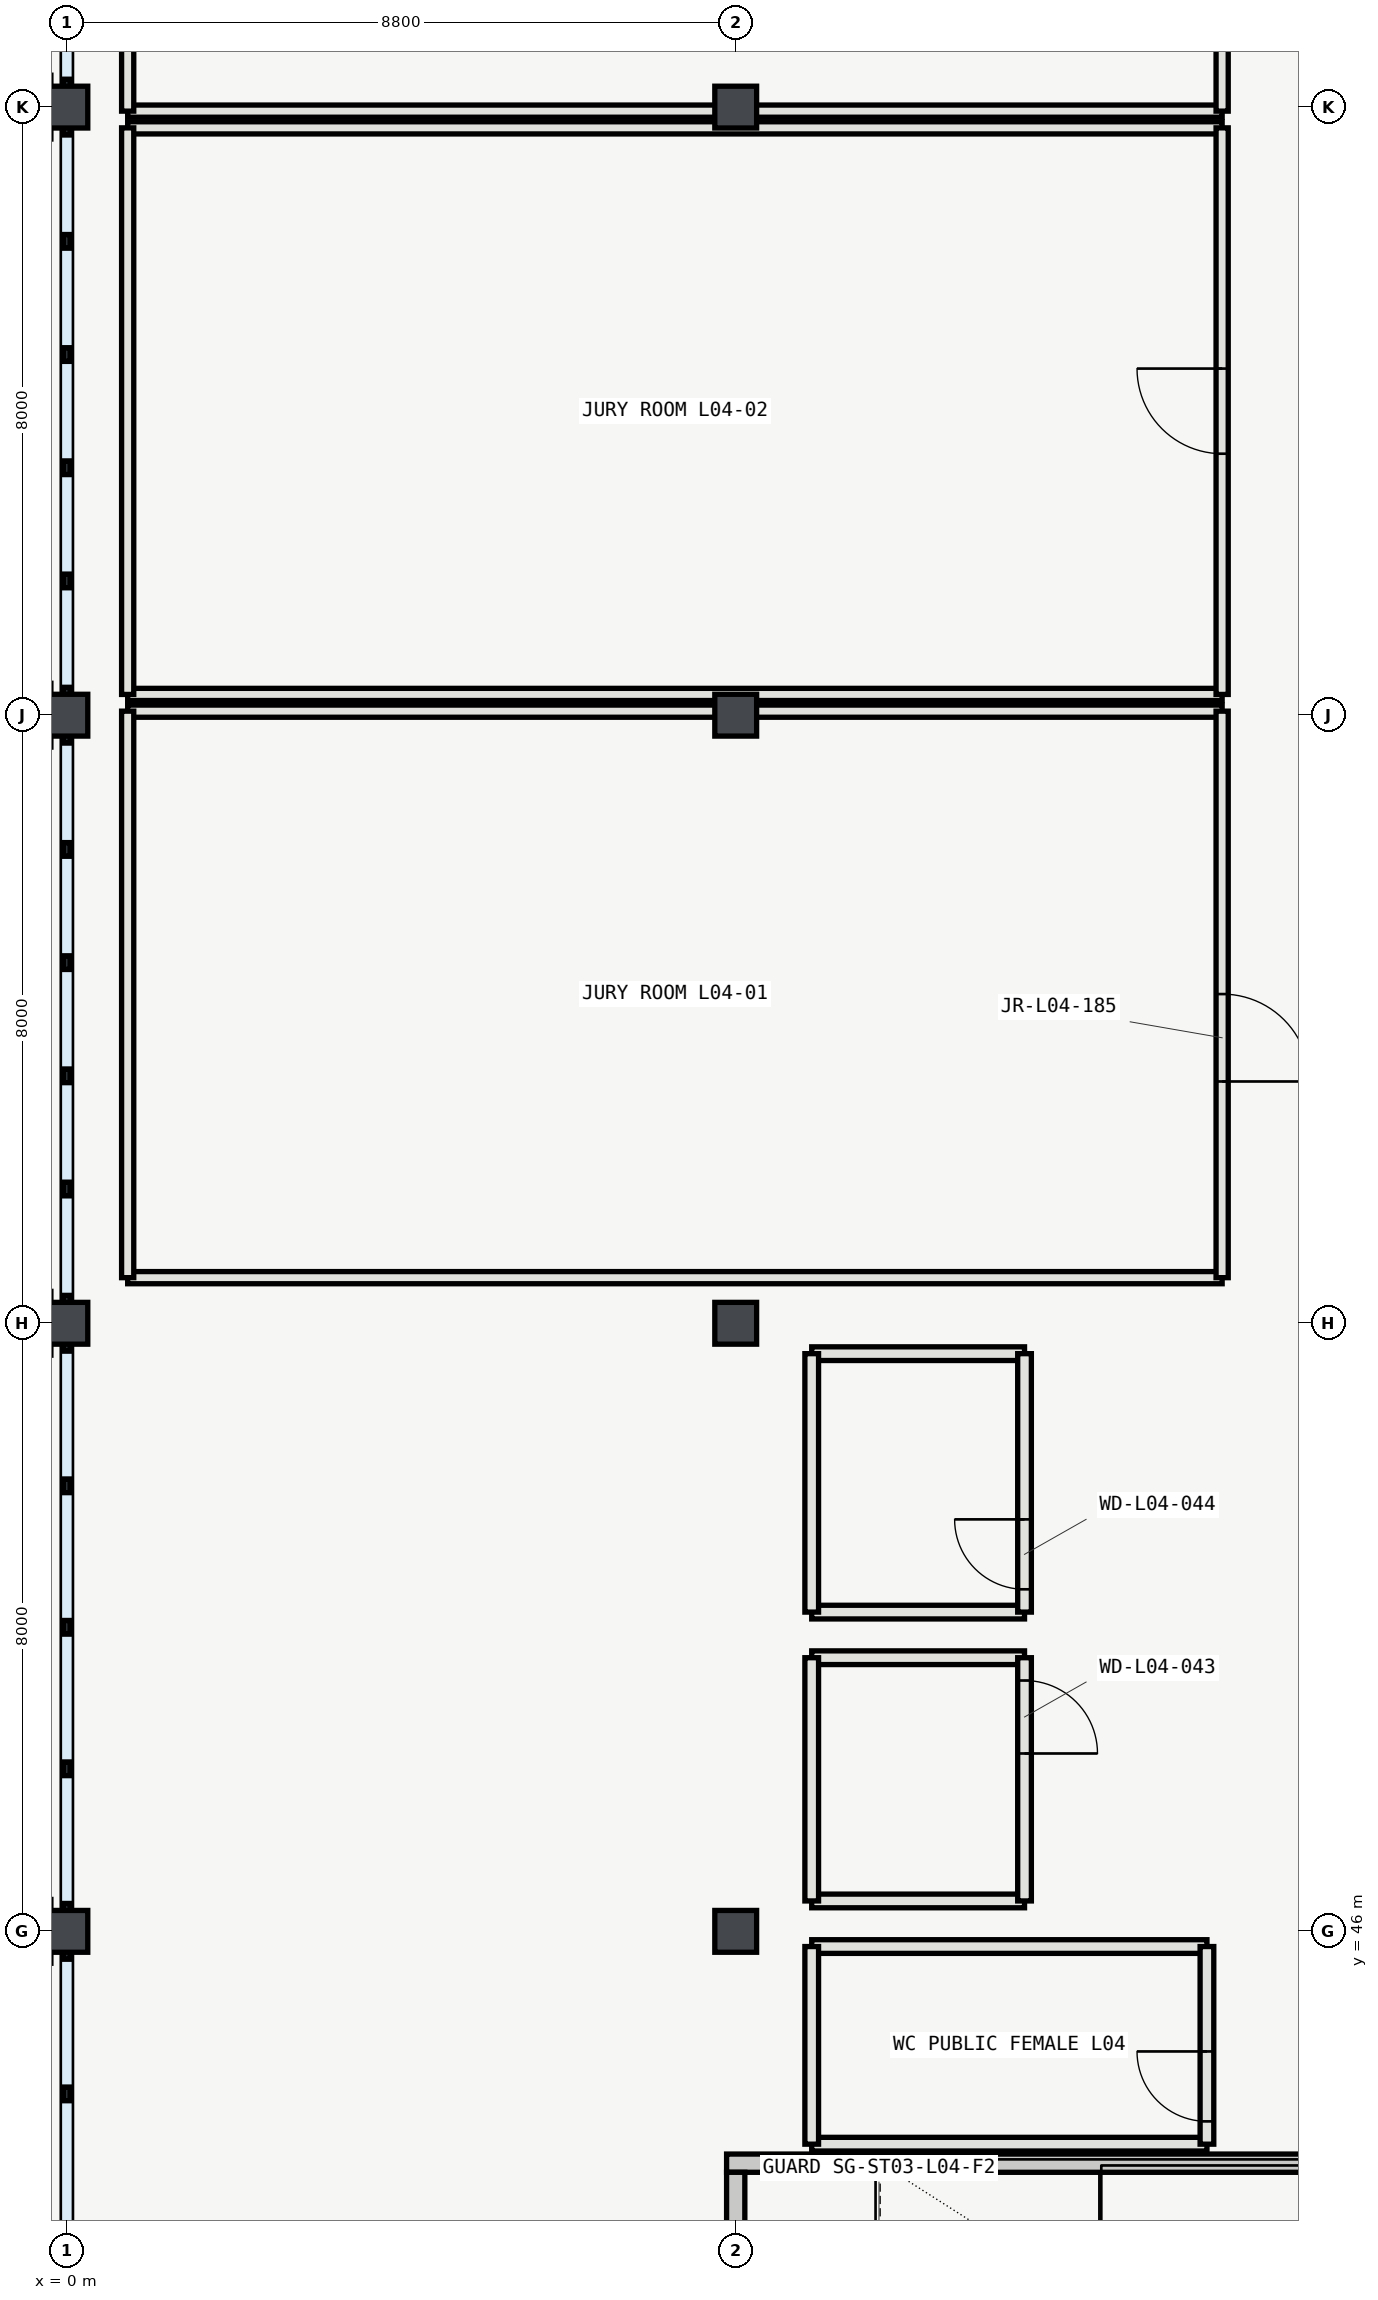
"""IFC4 building model, lengths in metres.
Left out: names, types, materials, properties, quantities, classifications, styles, units other than length and angle.
Written with IfcOpenShell. Run it as: python <this file> out.ifc"""

import sys

from ifc_helpers import new_model, si_unit, direction, frame, frame_2d, origin, origin_2d, place, context, subcontext, project, spatial, rectangle, hollow_rectangle, extrude, element, fill, save


model = new_model("IFC4")
c1 = context("Model", 3, precision=1e-05, world=origin(), true_north=direction((0.0, 1.0)))
c2 = subcontext(c1, "Body", "Model", "MODEL_VIEW")
j1 = project(units=[si_unit("LENGTHUNIT", "METRE"), si_unit("PLANEANGLEUNIT", "RADIAN")], contexts=[c1])
p1 = place(None, origin())
s1 = spatial("IfcSite", under=j1, at=p1, CompositionType="ELEMENT")
p2 = place(p1, origin())
s2 = spatial("IfcBuilding", under=s1, at=p2, CompositionType="ELEMENT")
p3 = place(p2, frame((0.0, 0.0, 20.4)))
s3 = spatial("IfcBuildingStorey", under=s2, at=p3, CompositionType="ELEMENT", Elevation=20.4)
for number, where, z_axis, x_axis in (
    (1, (0.0, 46.0, 0.0), (0.0, 0.0, 1.0), (1.0, 0.0, 0.0)),
    (2, (0.0, 54.0, 0.0), (0.0, 0.0, 1.0), (1.0, 0.0, 0.0)),
    (3, (0.0, 62.0, 0.0), (0.0, 0.0, 1.0), (1.0, 0.0, 0.0)),
    (4, (0.0, 70.0, 0.0), (0.0, 0.0, 1.0), (1.0, 0.0, 0.0)),
    (5, (8.8, 46.0, 0.0), (0.0, 0.0, 1.0), (1.0, 0.0, 0.0)),
    (6, (8.8, 54.0, 0.0), (0.0, 0.0, 1.0), (1.0, 0.0, 0.0)),
    (7, (8.8, 62.0, 0.0), (0.0, 0.0, 1.0), (1.0, 0.0, 0.0)),
    (8, (8.8, 70.0, 0.0), (0.0, 0.0, 1.0), (1.0, 0.0, 0.0)),
):
    element("IfcColumn", number, at=place(p3, frame(where, z_axis=z_axis, x_axis=x_axis)), inside=s3, PredefinedType="COLUMN", context=c2, shape_type="SweptSolid", body=[
        extrude(hollow_rectangle(XDim=0.55, YDim=0.55, WallThickness=0.022, InnerFilletRadius=0.022, OuterFilletRadius=0.044, at=origin_2d()), origin(), (0.0, 0.0, 1.0), 4.2),
    ])
for number, where, z_axis, x_axis in (
    (9, (9.8, 46.4, 0.0), (0.0, 0.0, 1.0), (1.0, 0.0, 0.0)),
    (10, (12.6, 49.6, 0.0), (0.0, 0.0, 1.0), (-1.0, 0.0, 0.0)),
):
    element("IfcWall", number, at=place(p3, frame(where, z_axis=z_axis, x_axis=x_axis)), inside=s3, PredefinedType="PLUMBINGWALL", context=c2, shape_type="SweptSolid", body=[
        extrude(rectangle(XDim=2.8, YDim=0.18, at=frame_2d((1.4, 0.0))), origin(), (0.0, 0.0, 1.0), 3.92),
    ])
p4 = place(p3, frame((9.8, 49.6, 0.0), z_axis=(0.0, 0.0, 1.0), x_axis=(0.0, -1.0, 0.0)))
e11 = element("IfcWall", 11, at=p4, inside=s3, PredefinedType="PLUMBINGWALL", context=c2, shape_type="SweptSolid", body=[
    extrude(rectangle(XDim=3.2, YDim=0.18, at=frame_2d((1.6, 0.0))), origin(), (0.0, 0.0, 1.0), 3.92),
])
p5 = place(p3, frame((12.6, 46.4, 0.0), z_axis=(0.0, 0.0, 1.0), x_axis=(0.0, 1.0, 0.0)))
e12 = element("IfcWall", 12, at=p5, inside=s3, PredefinedType="PLUMBINGWALL", context=c2, shape_type="SweptSolid", body=[
    extrude(rectangle(XDim=3.2, YDim=0.18, at=frame_2d((1.6, 0.0))), origin(), (0.0, 0.0, 1.0), 3.92),
])
p6 = place(p5, frame((1.94, 0.0, 0.0)))
e13 = element("IfcOpeningElement", 13, at=p6, cuts=e12, PredefinedType="OPENING", context=c2, shape_type="SweptSolid", body=[
    extrude(rectangle(XDim=0.96, YDim=2.1, at=frame_2d((0.48, 1.05))), frame((0.0, 0.1, 0.0), z_axis=(0.0, -1.0, 0.0), x_axis=(1.0, 0.0, 0.0)), (0.0, 0.0, 1.0), 0.2),
])
for number, where, z_axis, x_axis in (
    (14, (9.8, 50.2, 0.0), (0.0, 0.0, 1.0), (1.0, 0.0, 0.0)),
    (15, (12.6, 53.6, 0.0), (0.0, 0.0, 1.0), (-1.0, 0.0, 0.0)),
):
    element("IfcWall", number, at=place(p3, frame(where, z_axis=z_axis, x_axis=x_axis)), inside=s3, PredefinedType="PLUMBINGWALL", context=c2, shape_type="SweptSolid", body=[
        extrude(rectangle(XDim=2.8, YDim=0.18, at=frame_2d((1.4, 0.0))), origin(), (0.0, 0.0, 1.0), 3.92),
    ])
p7 = place(p3, frame((9.8, 53.6, 0.0), z_axis=(0.0, 0.0, 1.0), x_axis=(0.0, -1.0, 0.0)))
e16 = element("IfcWall", 16, at=p7, inside=s3, PredefinedType="PLUMBINGWALL", context=c2, shape_type="SweptSolid", body=[
    extrude(rectangle(XDim=3.4, YDim=0.18, at=frame_2d((1.7, 0.0))), origin(), (0.0, 0.0, 1.0), 3.92),
])
p8 = place(p3, frame((12.6, 50.2, 0.0), z_axis=(0.0, 0.0, 1.0), x_axis=(0.0, 1.0, 0.0)))
e17 = element("IfcWall", 17, at=p8, inside=s3, PredefinedType="PLUMBINGWALL", context=c2, shape_type="SweptSolid", body=[
    extrude(rectangle(XDim=3.4, YDim=0.18, at=frame_2d((1.7, 0.0))), origin(), (0.0, 0.0, 1.0), 3.92),
])
p9 = place(p8, frame((0.3, 0.0, 0.0)))
e18 = element("IfcOpeningElement", 18, at=p9, cuts=e17, PredefinedType="OPENING", context=c2, shape_type="SweptSolid", body=[
    extrude(rectangle(XDim=0.92, YDim=2.1, at=frame_2d((0.46, 1.05))), frame((0.0, 0.1, 0.0), z_axis=(0.0, -1.0, 0.0), x_axis=(1.0, 0.0, 0.0)), (0.0, 0.0, 1.0), 0.2),
])
p10 = place(p3, frame((9.8, 43.2, 0.0), z_axis=(0.0, 0.0, 1.0), x_axis=(1.0, 0.0, 0.0)))
e19 = element("IfcWall", 19, at=p10, inside=s3, PredefinedType="PLUMBINGWALL", context=c2, shape_type="SweptSolid", body=[
    extrude(rectangle(XDim=5.2, YDim=0.18, at=frame_2d((2.6, 0.0))), origin(), (0.0, 0.0, 1.0), 3.92),
])
p11 = place(p3, frame((15.0, 45.8, 0.0), z_axis=(0.0, 0.0, 1.0), x_axis=(-1.0, 0.0, 0.0)))
e20 = element("IfcWall", 20, at=p11, inside=s3, PredefinedType="PLUMBINGWALL", context=c2, shape_type="SweptSolid", body=[
    extrude(rectangle(XDim=5.2, YDim=0.18, at=frame_2d((2.6, 0.0))), origin(), (0.0, 0.0, 1.0), 3.596),
])
p12 = place(p3, frame((9.8, 45.8, 0.0), z_axis=(0.0, 0.0, 1.0), x_axis=(0.0, -1.0, 0.0)))
e21 = element("IfcWall", 21, at=p12, inside=s3, PredefinedType="PLUMBINGWALL", context=c2, shape_type="SweptSolid", body=[
    extrude(rectangle(XDim=2.6, YDim=0.18, at=frame_2d((1.3, 0.0))), origin(), (0.0, 0.0, 1.0), 3.92),
])
p13 = place(p3, frame((15.0, 43.2, 0.0), z_axis=(0.0, 0.0, 1.0), x_axis=(0.0, 1.0, 0.0)))
e22 = element("IfcWall", 22, at=p13, inside=s3, PredefinedType="PLUMBINGWALL", context=c2, shape_type="SweptSolid", body=[
    extrude(rectangle(XDim=2.6, YDim=0.18, at=frame_2d((1.3, 0.0))), origin(), (0.0, 0.0, 1.0), 3.92),
])
p14 = place(p13, frame((0.3, 0.0, 0.0)))
e23 = element("IfcOpeningElement", 23, at=p14, cuts=e22, PredefinedType="OPENING", context=c2, shape_type="SweptSolid", body=[
    extrude(rectangle(XDim=0.92, YDim=2.1, at=frame_2d((0.46, 1.05))), frame((0.0, 0.1, 0.0), z_axis=(0.0, -1.0, 0.0), x_axis=(1.0, 0.0, 0.0)), (0.0, 0.0, 1.0), 0.2),
])
p15 = place(p3, frame((0.8, 54.6, 0.0), z_axis=(0.0, 0.0, 1.0), x_axis=(1.0, 0.0, 0.0)))
e24 = element("IfcWall", 24, at=p15, inside=s3, PredefinedType="PARTITIONING", context=c2, shape_type="SweptSolid", body=[
    extrude(rectangle(XDim=14.4, YDim=0.16, at=frame_2d((7.2, 0.0))), origin(), (0.0, 0.0, 1.0), 3.92),
])
p16 = place(p3, frame((15.2, 62.053, 0.0), z_axis=(0.0, 0.0, 1.0), x_axis=(-1.0, 0.0, 0.0)))
e25 = element("IfcWall", 25, at=p16, inside=s3, PredefinedType="PARTITIONING", context=c2, shape_type="SweptSolid", body=[
    extrude(rectangle(XDim=14.4, YDim=0.16, at=frame_2d((7.2, 0.0))), origin(), (0.0, 0.0, 1.0), 3.596),
])
p17 = place(p3, frame((0.8, 62.053, 0.0), z_axis=(0.0, 0.0, 1.0), x_axis=(0.0, -1.0, 0.0)))
e26 = element("IfcWall", 26, at=p17, inside=s3, PredefinedType="PARTITIONING", context=c2, shape_type="SweptSolid", body=[
    extrude(rectangle(XDim=7.453, YDim=0.16, at=frame_2d((3.727, 0.0))), origin(), (0.0, 0.0, 1.0), 3.92),
])
p18 = place(p3, frame((15.2, 54.6, 0.0), z_axis=(0.0, 0.0, 1.0), x_axis=(0.0, 1.0, 0.0)))
e27 = element("IfcWall", 27, at=p18, inside=s3, PredefinedType="PARTITIONING", context=c2, shape_type="SweptSolid", body=[
    extrude(rectangle(XDim=7.453, YDim=0.16, at=frame_2d((3.727, 0.0))), origin(), (0.0, 0.0, 1.0), 3.92),
])
p19 = place(p18, frame((2.581, 0.0, 0.0)))
e28 = element("IfcOpeningElement", 28, at=p19, cuts=e27, PredefinedType="OPENING", context=c2, shape_type="SweptSolid", body=[
    extrude(rectangle(XDim=1.15, YDim=2.2, at=frame_2d((0.575, 1.1))), frame((0.0, 0.09, 0.0), z_axis=(0.0, -1.0, 0.0), x_axis=(1.0, 0.0, 0.0)), (0.0, 0.0, 1.0), 0.18),
])
p20 = place(p3, frame((0.8, 62.273, 0.0), z_axis=(0.0, 0.0, 1.0), x_axis=(1.0, 0.0, 0.0)))
e29 = element("IfcWall", 29, at=p20, inside=s3, PredefinedType="PARTITIONING", context=c2, shape_type="SweptSolid", body=[
    extrude(rectangle(XDim=14.4, YDim=0.16, at=frame_2d((7.2, 0.0))), origin(), (0.0, 0.0, 1.0), 3.596),
])
p21 = place(p3, frame((15.2, 69.727, 0.0), z_axis=(0.0, 0.0, 1.0), x_axis=(-1.0, 0.0, 0.0)))
e30 = element("IfcWall", 30, at=p21, inside=s3, PredefinedType="PARTITIONING", context=c2, shape_type="SweptSolid", body=[
    extrude(rectangle(XDim=14.4, YDim=0.16, at=frame_2d((7.2, 0.0))), origin(), (0.0, 0.0, 1.0), 3.546),
])
p22 = place(p3, frame((0.8, 69.727, 0.0), z_axis=(0.0, 0.0, 1.0), x_axis=(0.0, -1.0, 0.0)))
e31 = element("IfcWall", 31, at=p22, inside=s3, PredefinedType="PARTITIONING", context=c2, shape_type="SweptSolid", body=[
    extrude(rectangle(XDim=7.454, YDim=0.16, at=frame_2d((3.727, 0.0))), origin(), (0.0, 0.0, 1.0), 3.92),
])
p23 = place(p3, frame((15.2, 62.273, 0.0), z_axis=(0.0, 0.0, 1.0), x_axis=(0.0, 1.0, 0.0)))
e32 = element("IfcWall", 32, at=p23, inside=s3, PredefinedType="PARTITIONING", context=c2, shape_type="SweptSolid", body=[
    extrude(rectangle(XDim=7.454, YDim=0.16, at=frame_2d((3.727, 0.0))), origin(), (0.0, 0.0, 1.0), 3.92),
])
p24 = place(p23, frame((3.167, 0.0, 0.0)))
e33 = element("IfcOpeningElement", 33, at=p24, cuts=e32, PredefinedType="OPENING", context=c2, shape_type="SweptSolid", body=[
    extrude(rectangle(XDim=1.12, YDim=2.2, at=frame_2d((0.56, 1.1))), frame((0.0, 0.09, 0.0), z_axis=(0.0, -1.0, 0.0), x_axis=(1.0, 0.0, 0.0)), (0.0, 0.0, 1.0), 0.18),
])
p25 = place(p3, frame((0.8, 69.947, 0.0), z_axis=(0.0, 0.0, 1.0), x_axis=(1.0, 0.0, 0.0)))
e34 = element("IfcWall", 34, at=p25, inside=s3, PredefinedType="PARTITIONING", context=c2, shape_type="SweptSolid", body=[
    extrude(rectangle(XDim=14.4, YDim=0.16, at=frame_2d((7.2, 0.0))), origin(), (0.0, 0.0, 1.0), 3.546),
])
p26 = place(p3, frame((0.8, 77.4, 0.0), z_axis=(0.0, 0.0, 1.0), x_axis=(0.0, -1.0, 0.0)))
e35 = element("IfcWall", 35, at=p26, inside=s3, PredefinedType="PARTITIONING", context=c2, shape_type="SweptSolid", body=[
    extrude(rectangle(XDim=7.453, YDim=0.16, at=frame_2d((3.727, 0.0))), origin(), (0.0, 0.0, 1.0), 3.92),
])
p27 = place(p3, frame((15.2, 69.947, 0.0), z_axis=(0.0, 0.0, 1.0), x_axis=(0.0, 1.0, 0.0)))
e36 = element("IfcWall", 36, at=p27, inside=s3, PredefinedType="PARTITIONING", context=c2, shape_type="SweptSolid", body=[
    extrude(rectangle(XDim=7.453, YDim=0.16, at=frame_2d((3.727, 0.0))), origin(), (0.0, 0.0, 1.0), 3.92),
])
p28 = place(p27, frame((3.722, 0.0, 0.0)))
e37 = element("IfcOpeningElement", 37, at=p28, cuts=e36, PredefinedType="OPENING", context=c2, shape_type="SweptSolid", body=[
    extrude(rectangle(XDim=1.15, YDim=2.2, at=frame_2d((0.575, 1.1))), frame((0.0, 0.09, 0.0), z_axis=(0.0, -1.0, 0.0), x_axis=(1.0, 0.0, 0.0)), (0.0, 0.0, 1.0), 0.18),
])
p29 = place(p3, frame((17.72, 42.95, 0.0), z_axis=(0.0, 0.0, 1.0), x_axis=(-1.0, 0.0, 0.0)))
e38 = element("IfcWall", 38, at=p29, inside=s3, PredefinedType="SHEAR", context=c2, shape_type="SweptSolid", body=[
    extrude(rectangle(XDim=9.04, YDim=0.24, at=frame_2d((4.52, 0.0))), origin(), (0.0, 0.0, 1.0), 3.95),
])
p30 = place(p3, frame((8.8, 38.67, 0.0), z_axis=(0.0, 0.0, 1.0), x_axis=(0.0, 1.0, 0.0)))
e39 = element("IfcWall", 39, at=p30, inside=s3, PredefinedType="SHEAR", context=c2, shape_type="SweptSolid", body=[
    extrude(rectangle(XDim=4.16, YDim=0.24, at=frame_2d((2.08, 0.0))), origin(), (0.0, 0.0, 1.0), 3.95),
])
p31 = place(p30, frame((1.38, 0.0, 0.0)))
e40 = element("IfcOpeningElement", 40, at=p31, cuts=e39, PredefinedType="OPENING", context=c2, shape_type="SweptSolid", body=[
    extrude(rectangle(XDim=1.4, YDim=2.2, at=frame_2d((0.7, 1.1))), frame((0.0, 0.13, 0.0), z_axis=(0.0, -1.0, 0.0), x_axis=(1.0, 0.0, 0.0)), (0.0, 0.0, 1.0), 0.26),
])
p32 = place(p6, origin())
e41 = element("IfcDoor", 41, at=p32, inside=s3, OperationType="SINGLE_SWING_LEFT", PredefinedType="DOOR", context=c2, shape_type="SweptSolid", body=[
    extrude(rectangle(XDim=0.96, YDim=2.1, at=frame_2d((0.48, 1.05))), frame((0.0, 0.025, 0.0), z_axis=(0.0, -1.0, 0.0), x_axis=(1.0, 0.0, 0.0)), (0.0, 0.0, 1.0), 0.05),
])
fill(e13, e41)
p33 = place(p9, origin())
e42 = element("IfcDoor", 42, at=p33, inside=s3, OperationType="SINGLE_SWING_RIGHT", PredefinedType="DOOR", context=c2, shape_type="SweptSolid", body=[
    extrude(rectangle(XDim=0.92, YDim=2.1, at=frame_2d((0.46, 1.05))), frame((0.0, 0.025, 0.0), z_axis=(0.0, -1.0, 0.0), x_axis=(1.0, 0.0, 0.0)), (0.0, 0.0, 1.0), 0.05),
])
fill(e18, e42)
p34 = place(p14, origin())
e43 = element("IfcDoor", 43, at=p34, inside=s3, OperationType="SINGLE_SWING_RIGHT", PredefinedType="DOOR", context=c2, shape_type="SweptSolid", body=[
    extrude(rectangle(XDim=0.92, YDim=2.1, at=frame_2d((0.46, 1.05))), frame((0.0, 0.025, 0.0), z_axis=(0.0, -1.0, 0.0), x_axis=(1.0, 0.0, 0.0)), (0.0, 0.0, 1.0), 0.05),
])
fill(e23, e43)
p35 = place(p19, origin())
e44 = element("IfcDoor", 44, at=p35, inside=s3, OperationType="SINGLE_SWING_LEFT", PredefinedType="DOOR", context=c2, shape_type="SweptSolid", body=[
    extrude(rectangle(XDim=1.15, YDim=2.2, at=frame_2d((0.575, 1.1))), frame((0.0, 0.025, 0.0), z_axis=(0.0, -1.0, 0.0), x_axis=(1.0, 0.0, 0.0)), (0.0, 0.0, 1.0), 0.05),
])
fill(e28, e44)
p36 = place(p24, origin())
e45 = element("IfcDoor", 45, at=p36, inside=s3, OperationType="SINGLE_SWING_RIGHT", PredefinedType="DOOR", context=c2, shape_type="SweptSolid", body=[
    extrude(rectangle(XDim=1.12, YDim=2.2, at=frame_2d((0.56, 1.1))), frame((0.0, 0.025, 0.0), z_axis=(0.0, -1.0, 0.0), x_axis=(1.0, 0.0, 0.0)), (0.0, 0.0, 1.0), 0.05),
])
fill(e33, e45)
save(model, sys.argv[1])
